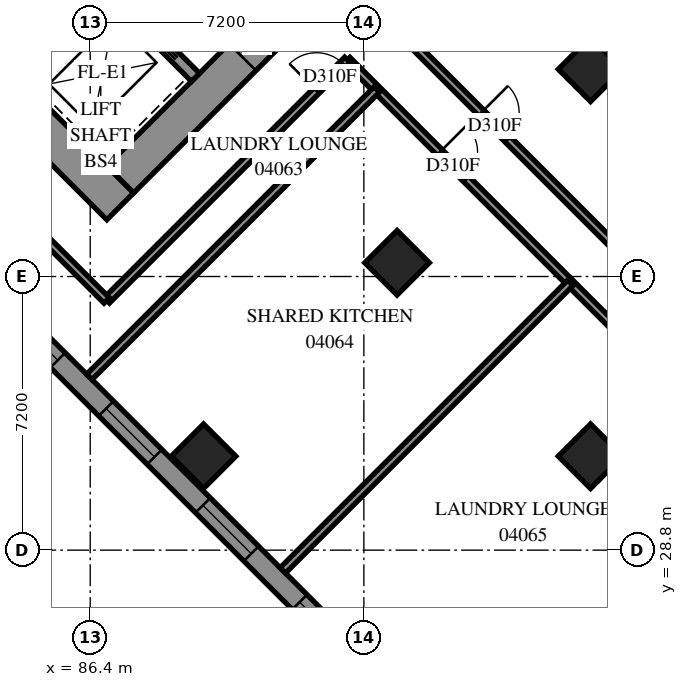
"""IFC4 building model, lengths in metres.
Left out: names, types, materials, properties, quantities, classifications, styles, units other than length and angle.
Written with IfcOpenShell. Run it as: python <this file> out.ifc"""

import sys

from ifc_helpers import new_model, si_unit, direction, frame, frame_2d, origin, origin_2d, place, context, subcontext, project, spatial, polyline, rectangle, outline, extrude, element, fill, save


model = new_model("IFC4")
c1 = context("Model", 3, precision=1e-05, world=origin(), true_north=direction((0.0, 1.0)))
c2 = subcontext(c1, "Body", "Model", "MODEL_VIEW")
j1 = project(units=[si_unit("LENGTHUNIT", "METRE"), si_unit("PLANEANGLEUNIT", "RADIAN")], contexts=[c1])
p1 = place(None, origin())
s1 = spatial("IfcSite", under=j1, at=p1, CompositionType="ELEMENT")
p2 = place(p1, origin())
s2 = spatial("IfcBuilding", under=s1, at=p2, CompositionType="ELEMENT")
p3 = place(p2, frame((0.0, 0.0, 18.6)))
s3 = spatial("IfcBuildingStorey", under=s2, at=p3, CompositionType="ELEMENT", Elevation=18.6)
for number, where, z_axis, x_axis in (
    (1, (99.565, 41.453, 0.0), (0.0, 0.0, 1.0), (0.707, -0.707, 0.0)),
    (2, (94.474, 36.362, 0.0), (0.0, 0.0, 1.0), (0.707, -0.707, 0.0)),
    (3, (89.382, 31.271, 0.0), (0.0, 0.0, 1.0), (0.707, -0.707, 0.0)),
    (4, (99.565, 31.271, 0.0), (0.0, 0.0, 1.0), (0.707, -0.707, 0.0)),
):
    element("IfcColumn", number, at=place(p3, frame(where, z_axis=z_axis, x_axis=x_axis)), inside=s3, PredefinedType="COLUMN", context=c2, shape_type="SweptSolid", body=[
        extrude(rectangle(XDim=1.2, YDim=1.2, at=origin_2d()), origin(), (0.0, 0.0, 1.0), 3.8),
    ])
p4 = place(p3, frame((75.594, 49.443, -0.4), z_axis=(0.0, 0.0, 1.0), x_axis=(0.7071037324, -0.70710983, 0.0)))
e5 = element("IfcWall", 5, at=p4, inside=s3, PredefinedType="SHEAR", context=c2, shape_type="SweptSolid", body=[
    extrude(rectangle(XDim=16.4, YDim=1.0, at=frame_2d((8.2, 0.0))), origin(), (0.0, 0.0, 1.0), 3.5),
])
p5 = place(p3, frame((87.19, 38.554, -0.4), z_axis=(0.0, 0.0, 1.0), x_axis=(0.707103309, 0.7071102534, 0.0)))
e6 = element("IfcWall", 6, at=p5, inside=s3, PredefinedType="SHEAR", context=c2, shape_type="SweptSolid", body=[
    extrude(rectangle(XDim=14.4, YDim=1.0, at=frame_2d((7.2, 0.0))), origin(), (0.0, 0.0, 1.0), 3.5),
])
p6 = place(p5, frame((4.55, 0.0, 0.4)))
e7 = element("IfcOpeningElement", 7, at=p6, cuts=e6, PredefinedType="OPENING", context=c2, shape_type="SweptSolid", body=[
    extrude(rectangle(XDim=1.1, YDim=2.1, at=frame_2d((0.55, 1.05))), frame((0.0, 0.51, 0.0), z_axis=(0.0, -1.0, 0.0), x_axis=(1.0, 0.0, 0.0)), (0.0, 0.0, 1.0), 1.02),
])
p7 = place(p5, frame((11.35, 0.0, 0.4)))
e8 = element("IfcOpeningElement", 8, at=p7, cuts=e6, PredefinedType="OPENING", context=c2, shape_type="SweptSolid", body=[
    extrude(rectangle(XDim=1.1, YDim=2.1, at=frame_2d((0.55, 1.05))), frame((0.0, 0.51, 0.0), z_axis=(0.0, -1.0, 0.0), x_axis=(1.0, 0.0, 0.0)), (0.0, 0.0, 1.0), 1.02),
])
p8 = place(p3, frame((84.291, 41.453, 0.0), z_axis=(0.0, 0.0, 1.0), x_axis=(0.7071067812, 0.7071067812, 0.0)))
e9 = element("IfcWall", 9, at=p8, inside=s3, PredefinedType="SOLIDWALL", context=c2, shape_type="SweptSolid", body=[
    extrude(rectangle(XDim=3.3, YDim=0.3, at=frame_2d((1.65, 0.0))), origin(), (0.0, 0.0, 1.0), 3.8),
])
p9 = place(p3, frame((78.988, 51.423, 0.0), z_axis=(0.0, 0.0, 1.0), x_axis=(0.7071067812, -0.7071067812, 0.0)))
e10 = element("IfcWall", 10, at=p9, inside=s3, PredefinedType="SOLIDWALL", context=c2, shape_type="SweptSolid", body=[
    extrude(rectangle(XDim=14.4, YDim=0.3, at=frame_2d((7.2, 0.0))), origin(), (0.0, 0.0, 1.0), 3.8),
])
p10 = place(p9, frame((1.25, 0.0, 0.0)))
e11 = element("IfcOpeningElement", 11, at=p10, cuts=e10, PredefinedType="OPENING", context=c2, shape_type="SweptSolid", body=[
    extrude(rectangle(XDim=1.1, YDim=2.1, at=frame_2d((0.55, 1.05))), frame((0.0, 0.16, 0.0), z_axis=(0.0, -1.0, 0.0), x_axis=(1.0, 0.0, 0.0)), (0.0, 0.0, 1.0), 0.32),
])
p11 = place(p9, frame((4.85, 0.0, 0.0)))
e12 = element("IfcOpeningElement", 12, at=p11, cuts=e10, PredefinedType="OPENING", context=c2, shape_type="SweptSolid", body=[
    extrude(rectangle(XDim=1.1, YDim=2.1, at=frame_2d((0.55, 1.05))), frame((0.0, 0.16, 0.0), z_axis=(0.0, -1.0, 0.0), x_axis=(1.0, 0.0, 0.0)), (0.0, 0.0, 1.0), 0.32),
])
p12 = place(p9, frame((8.45, 0.0, 0.0)))
e13 = element("IfcOpeningElement", 13, at=p12, cuts=e10, PredefinedType="OPENING", context=c2, shape_type="SweptSolid", body=[
    extrude(rectangle(XDim=1.1, YDim=2.1, at=frame_2d((0.55, 1.05))), frame((0.0, 0.16, 0.0), z_axis=(0.0, -1.0, 0.0), x_axis=(1.0, 0.0, 0.0)), (0.0, 0.0, 1.0), 0.32),
])
p13 = place(p9, frame((12.05, 0.0, 0.0)))
e14 = element("IfcOpeningElement", 14, at=p13, cuts=e10, PredefinedType="OPENING", context=c2, shape_type="SweptSolid", body=[
    extrude(rectangle(XDim=1.1, YDim=2.1, at=frame_2d((0.55, 1.05))), frame((0.0, 0.16, 0.0), z_axis=(0.0, -1.0, 0.0), x_axis=(1.0, 0.0, 0.0)), (0.0, 0.0, 1.0), 0.32),
])
p14 = place(p3, frame((117.843, 34.665, 0.0), z_axis=(0.0, 0.0, 1.0), x_axis=(-0.7071067812, 0.7071067812, 0.0)))
e15 = element("IfcWall", 15, at=p14, inside=s3, PredefinedType="SOLIDWALL", context=c2, shape_type="SweptSolid", body=[
    extrude(outline(polyline([(-0.275, -0.275), (54.222, -0.275), (53.994, 0.275), (0.275, 0.275), (-0.275, -0.275)])), origin(), (0.0, 0.0, 1.0), 3.8),
])
p15 = place(p14, frame((0.8, 0.0, 0.7)))
e16 = element("IfcOpeningElement", 16, at=p15, cuts=e15, PredefinedType="OPENING", context=c2, shape_type="SweptSolid", body=[
    extrude(rectangle(XDim=1.8, YDim=2.4, at=frame_2d((0.9, 1.2))), frame((0.0, 0.285, 0.0), z_axis=(0.0, -1.0, 0.0), x_axis=(1.0, 0.0, 0.0)), (0.0, 0.0, 1.0), 0.57),
])
p16 = place(p14, frame((4.225, 0.0, 0.7)))
e17 = element("IfcOpeningElement", 17, at=p16, cuts=e15, PredefinedType="OPENING", context=c2, shape_type="SweptSolid", body=[
    extrude(rectangle(XDim=1.8, YDim=2.4, at=frame_2d((0.9, 1.2))), frame((0.0, 0.285, 0.0), z_axis=(0.0, -1.0, 0.0), x_axis=(1.0, 0.0, 0.0)), (0.0, 0.0, 1.0), 0.57),
])
p17 = place(p14, frame((7.825, 0.0, 0.7)))
e18 = element("IfcOpeningElement", 18, at=p17, cuts=e15, PredefinedType="OPENING", context=c2, shape_type="SweptSolid", body=[
    extrude(rectangle(XDim=1.8, YDim=2.4, at=frame_2d((0.9, 1.2))), frame((0.0, 0.285, 0.0), z_axis=(0.0, -1.0, 0.0), x_axis=(1.0, 0.0, 0.0)), (0.0, 0.0, 1.0), 0.57),
])
p18 = place(p14, frame((11.425, 0.0, 0.7)))
e19 = element("IfcOpeningElement", 19, at=p18, cuts=e15, PredefinedType="OPENING", context=c2, shape_type="SweptSolid", body=[
    extrude(rectangle(XDim=1.8, YDim=2.4, at=frame_2d((0.9, 1.2))), frame((0.0, 0.285, 0.0), z_axis=(0.0, -1.0, 0.0), x_axis=(1.0, 0.0, 0.0)), (0.0, 0.0, 1.0), 0.57),
])
p19 = place(p14, frame((15.025, 0.0, 0.7)))
e20 = element("IfcOpeningElement", 20, at=p19, cuts=e15, PredefinedType="OPENING", context=c2, shape_type="SweptSolid", body=[
    extrude(rectangle(XDim=1.8, YDim=2.4, at=frame_2d((0.9, 1.2))), frame((0.0, 0.285, 0.0), z_axis=(0.0, -1.0, 0.0), x_axis=(1.0, 0.0, 0.0)), (0.0, 0.0, 1.0), 0.57),
])
p20 = place(p14, frame((18.625, 0.0, 0.7)))
e21 = element("IfcOpeningElement", 21, at=p20, cuts=e15, PredefinedType="OPENING", context=c2, shape_type="SweptSolid", body=[
    extrude(rectangle(XDim=1.8, YDim=2.4, at=frame_2d((0.9, 1.2))), frame((0.0, 0.285, 0.0), z_axis=(0.0, -1.0, 0.0), x_axis=(1.0, 0.0, 0.0)), (0.0, 0.0, 1.0), 0.57),
])
p21 = place(p14, frame((22.225, 0.0, 0.7)))
e22 = element("IfcOpeningElement", 22, at=p21, cuts=e15, PredefinedType="OPENING", context=c2, shape_type="SweptSolid", body=[
    extrude(rectangle(XDim=1.8, YDim=2.4, at=frame_2d((0.9, 1.2))), frame((0.0, 0.285, 0.0), z_axis=(0.0, -1.0, 0.0), x_axis=(1.0, 0.0, 0.0)), (0.0, 0.0, 1.0), 0.57),
])
p22 = place(p14, frame((25.825, 0.0, 0.7)))
e23 = element("IfcOpeningElement", 23, at=p22, cuts=e15, PredefinedType="OPENING", context=c2, shape_type="SweptSolid", body=[
    extrude(rectangle(XDim=1.8, YDim=2.4, at=frame_2d((0.9, 1.2))), frame((0.0, 0.285, 0.0), z_axis=(0.0, -1.0, 0.0), x_axis=(1.0, 0.0, 0.0)), (0.0, 0.0, 1.0), 0.57),
])
p23 = place(p14, frame((29.425, 0.0, 0.7)))
e24 = element("IfcOpeningElement", 24, at=p23, cuts=e15, PredefinedType="OPENING", context=c2, shape_type="SweptSolid", body=[
    extrude(rectangle(XDim=1.8, YDim=2.4, at=frame_2d((0.9, 1.2))), frame((0.0, 0.285, 0.0), z_axis=(0.0, -1.0, 0.0), x_axis=(1.0, 0.0, 0.0)), (0.0, 0.0, 1.0), 0.57),
])
p24 = place(p14, frame((33.025, 0.0, 0.7)))
e25 = element("IfcOpeningElement", 25, at=p24, cuts=e15, PredefinedType="OPENING", context=c2, shape_type="SweptSolid", body=[
    extrude(rectangle(XDim=1.8, YDim=2.4, at=frame_2d((0.9, 1.2))), frame((0.0, 0.285, 0.0), z_axis=(0.0, -1.0, 0.0), x_axis=(1.0, 0.0, 0.0)), (0.0, 0.0, 1.0), 0.57),
])
p25 = place(p14, frame((36.625, 0.0, 0.7)))
e26 = element("IfcOpeningElement", 26, at=p25, cuts=e15, PredefinedType="OPENING", context=c2, shape_type="SweptSolid", body=[
    extrude(rectangle(XDim=1.8, YDim=2.4, at=frame_2d((0.9, 1.2))), frame((0.0, 0.285, 0.0), z_axis=(0.0, -1.0, 0.0), x_axis=(1.0, 0.0, 0.0)), (0.0, 0.0, 1.0), 0.57),
])
p26 = place(p14, frame((40.225, 0.0, 0.7)))
e27 = element("IfcOpeningElement", 27, at=p26, cuts=e15, PredefinedType="OPENING", context=c2, shape_type="SweptSolid", body=[
    extrude(rectangle(XDim=1.8, YDim=2.4, at=frame_2d((0.9, 1.2))), frame((0.0, 0.285, 0.0), z_axis=(0.0, -1.0, 0.0), x_axis=(1.0, 0.0, 0.0)), (0.0, 0.0, 1.0), 0.57),
])
p27 = place(p14, frame((43.825, 0.0, 0.7)))
e28 = element("IfcOpeningElement", 28, at=p27, cuts=e15, PredefinedType="OPENING", context=c2, shape_type="SweptSolid", body=[
    extrude(rectangle(XDim=1.8, YDim=2.4, at=frame_2d((0.9, 1.2))), frame((0.0, 0.285, 0.0), z_axis=(0.0, -1.0, 0.0), x_axis=(1.0, 0.0, 0.0)), (0.0, 0.0, 1.0), 0.57),
])
p28 = place(p14, frame((47.425, 0.0, 0.7)))
e29 = element("IfcOpeningElement", 29, at=p28, cuts=e15, PredefinedType="OPENING", context=c2, shape_type="SweptSolid", body=[
    extrude(rectangle(XDim=1.8, YDim=2.4, at=frame_2d((0.9, 1.2))), frame((0.0, 0.285, 0.0), z_axis=(0.0, -1.0, 0.0), x_axis=(1.0, 0.0, 0.0)), (0.0, 0.0, 1.0), 0.57),
])
p29 = place(p14, frame((51.06, 0.0, 0.7)))
e30 = element("IfcOpeningElement", 30, at=p29, cuts=e15, PredefinedType="OPENING", context=c2, shape_type="SweptSolid", body=[
    extrude(rectangle(XDim=1.8, YDim=2.4, at=frame_2d((0.9, 1.2))), frame((0.0, 0.285, 0.0), z_axis=(0.0, -1.0, 0.0), x_axis=(1.0, 0.0, 0.0)), (0.0, 0.0, 1.0), 0.57),
])
p30 = place(p3, frame((77.07, 42.275, 0.0), z_axis=(0.0, 0.0, 1.0), x_axis=(0.7071067812, -0.7071067812, 0.0)))
e31 = element("IfcWall", 31, at=p30, inside=s3, PredefinedType="SOLIDWALL", context=c2, shape_type="SweptSolid", body=[
    extrude(outline(polyline([(0.114, -0.275), (39.288, -0.275), (38.737, 0.275), (-0.114, 0.275), (0.114, -0.275)])), origin(), (0.0, 0.0, 1.0), 3.8),
])
p31 = place(p30, frame((2.837, 0.0, 0.7)))
e32 = element("IfcOpeningElement", 32, at=p31, cuts=e31, PredefinedType="OPENING", context=c2, shape_type="SweptSolid", body=[
    extrude(rectangle(XDim=1.8, YDim=2.4, at=frame_2d((0.9, 1.2))), frame((0.0, 0.285, 0.0), z_axis=(0.0, -1.0, 0.0), x_axis=(1.0, 0.0, 0.0)), (0.0, 0.0, 1.0), 0.57),
])
p32 = place(p30, frame((6.588, 0.0, 0.7)))
e33 = element("IfcOpeningElement", 33, at=p32, cuts=e31, PredefinedType="OPENING", context=c2, shape_type="SweptSolid", body=[
    extrude(rectangle(XDim=1.8, YDim=2.4, at=frame_2d((0.9, 1.2))), frame((0.0, 0.285, 0.0), z_axis=(0.0, -1.0, 0.0), x_axis=(1.0, 0.0, 0.0)), (0.0, 0.0, 1.0), 0.57),
])
p33 = place(p30, frame((10.188, 0.0, 0.7)))
e34 = element("IfcOpeningElement", 34, at=p33, cuts=e31, PredefinedType="OPENING", context=c2, shape_type="SweptSolid", body=[
    extrude(rectangle(XDim=1.8, YDim=2.4, at=frame_2d((0.9, 1.2))), frame((0.0, 0.285, 0.0), z_axis=(0.0, -1.0, 0.0), x_axis=(1.0, 0.0, 0.0)), (0.0, 0.0, 1.0), 0.57),
])
p34 = place(p30, frame((13.787, 0.0, 0.7)))
e35 = element("IfcOpeningElement", 35, at=p34, cuts=e31, PredefinedType="OPENING", context=c2, shape_type="SweptSolid", body=[
    extrude(rectangle(XDim=1.8, YDim=2.4, at=frame_2d((0.9, 1.2))), frame((0.0, 0.285, 0.0), z_axis=(0.0, -1.0, 0.0), x_axis=(1.0, 0.0, 0.0)), (0.0, 0.0, 1.0), 0.57),
])
p35 = place(p30, frame((17.387, 0.0, 0.7)))
e36 = element("IfcOpeningElement", 36, at=p35, cuts=e31, PredefinedType="OPENING", context=c2, shape_type="SweptSolid", body=[
    extrude(rectangle(XDim=1.8, YDim=2.4, at=frame_2d((0.9, 1.2))), frame((0.0, 0.285, 0.0), z_axis=(0.0, -1.0, 0.0), x_axis=(1.0, 0.0, 0.0)), (0.0, 0.0, 1.0), 0.57),
])
p36 = place(p30, frame((20.988, 0.0, 0.7)))
e37 = element("IfcOpeningElement", 37, at=p36, cuts=e31, PredefinedType="OPENING", context=c2, shape_type="SweptSolid", body=[
    extrude(rectangle(XDim=1.8, YDim=2.4, at=frame_2d((0.9, 1.2))), frame((0.0, 0.285, 0.0), z_axis=(0.0, -1.0, 0.0), x_axis=(1.0, 0.0, 0.0)), (0.0, 0.0, 1.0), 0.57),
])
p37 = place(p30, frame((24.587, 0.0, 0.7)))
e38 = element("IfcOpeningElement", 38, at=p37, cuts=e31, PredefinedType="OPENING", context=c2, shape_type="SweptSolid", body=[
    extrude(rectangle(XDim=1.8, YDim=2.4, at=frame_2d((0.9, 1.2))), frame((0.0, 0.285, 0.0), z_axis=(0.0, -1.0, 0.0), x_axis=(1.0, 0.0, 0.0)), (0.0, 0.0, 1.0), 0.57),
])
p38 = place(p30, frame((28.188, 0.0, 0.7)))
e39 = element("IfcOpeningElement", 39, at=p38, cuts=e31, PredefinedType="OPENING", context=c2, shape_type="SweptSolid", body=[
    extrude(rectangle(XDim=1.8, YDim=2.4, at=frame_2d((0.9, 1.2))), frame((0.0, 0.285, 0.0), z_axis=(0.0, -1.0, 0.0), x_axis=(1.0, 0.0, 0.0)), (0.0, 0.0, 1.0), 0.57),
])
p39 = place(p30, frame((31.788, 0.0, 0.7)))
e40 = element("IfcOpeningElement", 40, at=p39, cuts=e31, PredefinedType="OPENING", context=c2, shape_type="SweptSolid", body=[
    extrude(rectangle(XDim=1.8, YDim=2.4, at=frame_2d((0.9, 1.2))), frame((0.0, 0.285, 0.0), z_axis=(0.0, -1.0, 0.0), x_axis=(1.0, 0.0, 0.0)), (0.0, 0.0, 1.0), 0.57),
])
p40 = place(p30, frame((35.388, 0.0, 0.7)))
e41 = element("IfcOpeningElement", 41, at=p40, cuts=e31, PredefinedType="OPENING", context=c2, shape_type="SweptSolid", body=[
    extrude(rectangle(XDim=1.8, YDim=2.4, at=frame_2d((0.9, 1.2))), frame((0.0, 0.285, 0.0), z_axis=(0.0, -1.0, 0.0), x_axis=(1.0, 0.0, 0.0)), (0.0, 0.0, 1.0), 0.57),
])
p41 = place(p3, frame((93.163, 41.697, 0.0), z_axis=(0.0, 0.0, 1.0), x_axis=(0.7071067812, -0.7071067812, 0.0)))
e42 = element("IfcWall", 42, at=p41, inside=s3, PredefinedType="PARTITIONING", context=c2, shape_type="SweptSolid", body=[
    extrude(rectangle(XDim=26.299, YDim=0.2, at=frame_2d((13.149, 0.0))), origin(), (0.0, 0.0, 1.0), 3.8),
])
p42 = place(p41, frame((3.437, 0.0, 0.0)))
e43 = element("IfcOpeningElement", 43, at=p42, cuts=e42, PredefinedType="OPENING", context=c2, shape_type="SweptSolid", body=[
    extrude(rectangle(XDim=1.0, YDim=2.1, at=frame_2d((0.5, 1.05))), frame((0.0, 0.11, 0.0), z_axis=(0.0, -1.0, 0.0), x_axis=(1.0, 0.0, 0.0)), (0.0, 0.0, 1.0), 0.22),
])
p43 = place(p41, frame((10.637, 0.0, 0.0)))
e44 = element("IfcOpeningElement", 44, at=p43, cuts=e42, PredefinedType="OPENING", context=c2, shape_type="SweptSolid", body=[
    extrude(rectangle(XDim=1.0, YDim=2.1, at=frame_2d((0.5, 1.05))), frame((0.0, 0.11, 0.0), z_axis=(0.0, -1.0, 0.0), x_axis=(1.0, 0.0, 0.0)), (0.0, 0.0, 1.0), 0.22),
])
p44 = place(p41, frame((16.024, 0.0, 0.0)))
e45 = element("IfcOpeningElement", 45, at=p44, cuts=e42, PredefinedType="OPENING", context=c2, shape_type="SweptSolid", body=[
    extrude(rectangle(XDim=1.0, YDim=2.1, at=frame_2d((0.5, 1.05))), frame((0.0, 0.11, 0.0), z_axis=(0.0, -1.0, 0.0), x_axis=(1.0, 0.0, 0.0)), (0.0, 0.0, 1.0), 0.22),
])
p45 = place(p41, frame((22.657, 0.0, 0.0)))
e46 = element("IfcOpeningElement", 46, at=p45, cuts=e42, PredefinedType="OPENING", context=c2, shape_type="SweptSolid", body=[
    extrude(rectangle(XDim=1.0, YDim=2.1, at=frame_2d((0.5, 1.05))), frame((0.0, 0.11, 0.0), z_axis=(0.0, -1.0, 0.0), x_axis=(1.0, 0.0, 0.0)), (0.0, 0.0, 1.0), 0.22),
])
for number, where, z_axis, x_axis in (
    (47, (96.559, 23.175, 0.0), (0.0, 0.0, 1.0), (0.707, 0.707, 0.0)),
    (48, (86.376, 33.357, 0.0), (0.0, 0.0, 1.0), (0.707, 0.707, 0.0)),
):
    element("IfcWall", number, at=place(p3, frame(where, z_axis=z_axis, x_axis=x_axis)), inside=s3, PredefinedType="PARTITIONING", context=c2, shape_type="SweptSolid", body=[
        extrude(rectangle(XDim=10.7, YDim=0.2, at=frame_2d((5.35, 0.0))), origin(), (0.0, 0.0, 1.0), 3.8),
    ])
p46 = place(p3, frame((91.468, 28.266, 0.0), z_axis=(0.0, 0.0, 1.0), x_axis=(0.7071067812, 0.7071067812, 0.0)))
e49 = element("IfcWall", 49, at=p46, inside=s3, PredefinedType="PARTITIONING", context=c2, shape_type="SweptSolid", body=[
    extrude(rectangle(XDim=10.7, YDim=0.2, at=frame_2d((5.35, 0.0))), origin(), (0.0, 0.0, 1.0), 3.8),
])
p47 = place(p3, frame((86.836, 35.372, 0.0), z_axis=(0.0, 0.0, 1.0), x_axis=(0.7071067812, 0.7071067812, 0.0)))
e50 = element("IfcWall", 50, at=p47, inside=s3, PredefinedType="PARTITIONING", context=c2, shape_type="SweptSolid", body=[
    extrude(rectangle(XDim=8.949, YDim=0.2, at=frame_2d((4.474, 0.0))), origin(), (0.0, 0.0, 1.0), 3.8),
])
p48 = place(p47, frame((7.8, 0.0, 0.0)))
e51 = element("IfcOpeningElement", 51, at=p48, cuts=e50, PredefinedType="OPENING", context=c2, shape_type="SweptSolid", body=[
    extrude(rectangle(XDim=1.0, YDim=2.1, at=frame_2d((0.5, 1.05))), frame((0.0, 0.11, 0.0), z_axis=(0.0, -1.0, 0.0), x_axis=(1.0, 0.0, 0.0)), (0.0, 0.0, 1.0), 0.22),
])
p49 = place(p3, frame((94.371, 42.623, 0.0), z_axis=(0.0, 0.0, 1.0), x_axis=(0.7071067812, -0.7071067812, 0.0)))
e52 = element("IfcWall", 52, at=p49, inside=s3, PredefinedType="PARTITIONING", context=c2, shape_type="SweptSolid", body=[
    extrude(outline(polyline([(0.0, -0.1), (11.7, -0.1), (11.7, 0.1), (0.0, 0.1), (0.0, -0.1)])), origin(), (0.0, 0.0, 1.0), 3.8),
])
p50 = place(p49, frame((3.274, 0.0, 0.0)))
e53 = element("IfcOpeningElement", 53, at=p50, cuts=e52, PredefinedType="OPENING", context=c2, shape_type="SweptSolid", body=[
    extrude(rectangle(XDim=1.0, YDim=2.1, at=frame_2d((0.5, 1.05))), frame((0.0, 0.11, 0.0), z_axis=(0.0, -1.0, 0.0), x_axis=(1.0, 0.0, 0.0)), (0.0, 0.0, 1.0), 0.22),
])
p51 = place(p49, frame((10.473, 0.0, 0.0)))
e54 = element("IfcOpeningElement", 54, at=p51, cuts=e52, PredefinedType="OPENING", context=c2, shape_type="SweptSolid", body=[
    extrude(rectangle(XDim=1.0, YDim=2.1, at=frame_2d((0.5, 1.05))), frame((0.0, 0.11, 0.0), z_axis=(0.0, -1.0, 0.0), x_axis=(1.0, 0.0, 0.0)), (0.0, 0.0, 1.0), 0.22),
])
p52 = place(p3, frame((85.065, 37.137, 0.0), z_axis=(0.0, 0.0, 1.0), x_axis=(0.7071067812, -0.7071067812, 0.0)))
e55 = element("IfcWall", 55, at=p52, inside=s3, PredefinedType="PARTITIONING", context=c2, shape_type="SweptSolid", body=[
    extrude(rectangle(XDim=2.5, YDim=0.2, at=frame_2d((1.25, 0.0))), origin(), (0.0, 0.0, 1.0), 3.8),
])
p53 = place(p33, origin())
e56 = element("IfcWindow", 56, at=p53, inside=s3, PartitioningType="SINGLE_PANEL", PredefinedType="WINDOW", context=c2, shape_type="SweptSolid", body=[
    extrude(rectangle(XDim=1.8, YDim=2.4, at=frame_2d((0.9, 1.2))), frame((0.0, 0.155, 0.0), z_axis=(0.0, -1.0, 0.0), x_axis=(1.0, 0.0, 0.0)), (0.0, 0.0, 1.0), 0.06),
])
fill(e34, e56)
p54 = place(p34, origin())
e57 = element("IfcWindow", 57, at=p54, inside=s3, PartitioningType="SINGLE_PANEL", PredefinedType="WINDOW", context=c2, shape_type="SweptSolid", body=[
    extrude(rectangle(XDim=1.8, YDim=2.4, at=frame_2d((0.9, 1.2))), frame((0.0, 0.155, 0.0), z_axis=(0.0, -1.0, 0.0), x_axis=(1.0, 0.0, 0.0)), (0.0, 0.0, 1.0), 0.06),
])
fill(e35, e57)
p55 = place(p35, origin())
e58 = element("IfcWindow", 58, at=p55, inside=s3, PartitioningType="SINGLE_PANEL", PredefinedType="WINDOW", context=c2, shape_type="SweptSolid", body=[
    extrude(rectangle(XDim=1.8, YDim=2.4, at=frame_2d((0.9, 1.2))), frame((0.0, 0.155, 0.0), z_axis=(0.0, -1.0, 0.0), x_axis=(1.0, 0.0, 0.0)), (0.0, 0.0, 1.0), 0.06),
])
fill(e36, e58)
p56 = place(p36, origin())
e59 = element("IfcWindow", 59, at=p56, inside=s3, PartitioningType="SINGLE_PANEL", PredefinedType="WINDOW", context=c2, shape_type="SweptSolid", body=[
    extrude(rectangle(XDim=1.8, YDim=2.4, at=frame_2d((0.9, 1.2))), frame((0.0, 0.155, 0.0), z_axis=(0.0, -1.0, 0.0), x_axis=(1.0, 0.0, 0.0)), (0.0, 0.0, 1.0), 0.06),
])
fill(e37, e59)
p57 = place(p6, origin())
e60 = element("IfcDoor", 60, at=p57, inside=s3, OperationType="DOUBLE_DOOR_SINGLE_SWING", PredefinedType="DOOR", context=c2, shape_type="SweptSolid", body=[
    extrude(rectangle(XDim=1.1, YDim=2.1, at=frame_2d((0.55, 1.05))), frame((0.0, 0.025, 0.0), z_axis=(0.0, -1.0, 0.0), x_axis=(1.0, 0.0, 0.0)), (0.0, 0.0, 1.0), 0.05),
])
fill(e7, e60)
p58 = place(p50, origin())
e61 = element("IfcDoor", 61, at=p58, inside=s3, OperationType="SINGLE_SWING_RIGHT", PredefinedType="DOOR", context=c2, shape_type="SweptSolid", body=[
    extrude(rectangle(XDim=1.0, YDim=2.1, at=frame_2d((0.5, 1.05))), frame((0.0, 0.025, 0.0), z_axis=(0.0, -1.0, 0.0), x_axis=(1.0, 0.0, 0.0)), (0.0, 0.0, 1.0), 0.05),
])
fill(e53, e61)
p59 = place(p48, origin())
e62 = element("IfcDoor", 62, at=p59, inside=s3, OperationType="SINGLE_SWING_RIGHT", PredefinedType="DOOR", context=c2, shape_type="SweptSolid", body=[
    extrude(rectangle(XDim=1.0, YDim=2.1, at=frame_2d((0.5, 1.05))), frame((0.0, 0.025, 0.0), z_axis=(0.0, -1.0, 0.0), x_axis=(1.0, 0.0, 0.0)), (0.0, 0.0, 1.0), 0.05),
])
fill(e51, e62)
p60 = place(p42, origin())
e63 = element("IfcDoor", 63, at=p60, inside=s3, OperationType="SINGLE_SWING_LEFT", PredefinedType="DOOR", context=c2, shape_type="SweptSolid", body=[
    extrude(rectangle(XDim=1.0, YDim=2.1, at=frame_2d((0.5, 1.05))), frame((0.0, 0.025, 0.0), z_axis=(0.0, -1.0, 0.0), x_axis=(1.0, 0.0, 0.0)), (0.0, 0.0, 1.0), 0.05),
])
fill(e43, e63)
save(model, sys.argv[1])
